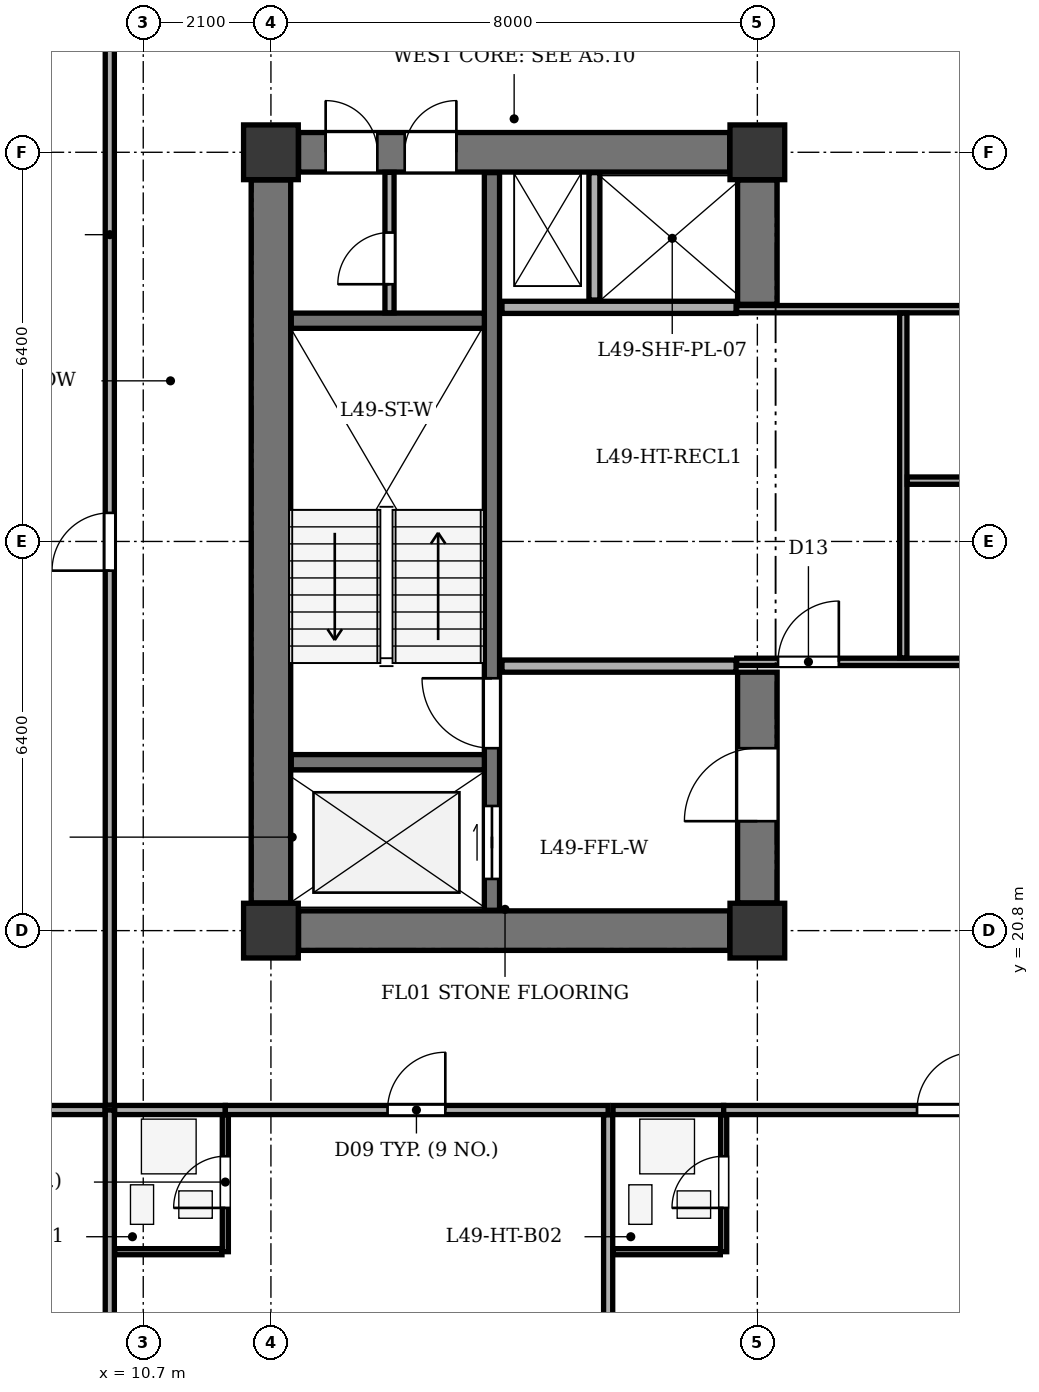
"""IFC4 building model, lengths in metres.
Left out: names, types, materials, properties, quantities, classifications, styles, units other than length and angle.
Written with IfcOpenShell. Run it as: python <this file> out.ifc"""

import sys

from ifc_helpers import new_model, si_unit, direction, frame, frame_2d, origin, origin_2d, place, context, subcontext, project, spatial, rectangle, extrude, element, fill, save


model = new_model("IFC4")
c1 = context("Model", 3, precision=1e-05, world=origin(), true_north=direction((0.0, 1.0)))
c2 = subcontext(c1, "Body", "Model", "MODEL_VIEW")
j1 = project(units=[si_unit("LENGTHUNIT", "METRE"), si_unit("PLANEANGLEUNIT", "RADIAN")], contexts=[c1])
p1 = place(None, origin())
s1 = spatial("IfcSite", under=j1, at=p1, CompositionType="ELEMENT")
p2 = place(p1, origin())
s2 = spatial("IfcBuilding", under=s1, at=p2, CompositionType="ELEMENT")
p3 = place(p2, frame((0.0, 0.0, 190.3)))
s3 = spatial("IfcBuildingStorey", under=s2, at=p3, CompositionType="ELEMENT", Elevation=190.3)
for number, where, z_axis, x_axis in (
    (1, (12.8, 20.8, 0.0), (0.0, 0.0, 1.0), (1.0, 0.0, 0.0)),
    (2, (20.8, 20.8, 0.0), (0.0, 0.0, 1.0), (1.0, 0.0, 0.0)),
    (3, (12.8, 33.6, 0.0), (0.0, 0.0, 1.0), (1.0, 0.0, 0.0)),
    (4, (20.8, 33.6, 0.0), (0.0, 0.0, 1.0), (1.0, 0.0, 0.0)),
):
    element("IfcColumn", number, at=place(p3, frame(where, z_axis=z_axis, x_axis=x_axis)), inside=s3, PredefinedType="COLUMN", context=c2, shape_type="SweptSolid", body=[
        extrude(rectangle(XDim=0.9, YDim=0.9, at=origin_2d()), origin(), (0.0, 0.0, 1.0), 3.5),
    ])
p4 = place(p3, frame((12.8, 21.255, 0.0), z_axis=(0.0, 0.0, 1.0), x_axis=(0.0, 1.0, 0.0)))
e5 = element("IfcWall", 5, at=p4, inside=s3, PredefinedType="SHEAR", context=c2, shape_type="SweptSolid", body=[
    extrude(rectangle(XDim=11.89, YDim=0.65, at=frame_2d((5.945, 0.0))), origin(), (0.0, 0.0, 1.0), 3.2),
])
p5 = place(p3, frame((13.255, 20.8, 0.0), z_axis=(0.0, 0.0, 1.0), x_axis=(1.0, 0.0, 0.0)))
e6 = element("IfcWall", 6, at=p5, inside=s3, PredefinedType="SHEAR", context=c2, shape_type="SweptSolid", body=[
    extrude(rectangle(XDim=7.09, YDim=0.65, at=frame_2d((3.545, 0.0))), origin(), (0.0, 0.0, 1.0), 3.2),
])
p6 = place(p3, frame((13.255, 33.6, 0.0), z_axis=(0.0, 0.0, 1.0), x_axis=(1.0, 0.0, 0.0)))
e7 = element("IfcWall", 7, at=p6, inside=s3, PredefinedType="SHEAR", context=c2, shape_type="SweptSolid", body=[
    extrude(rectangle(XDim=7.09, YDim=0.65, at=frame_2d((3.545, 0.0))), origin(), (0.0, 0.0, 1.0), 3.2),
])
p7 = place(p6, frame((0.445, 0.0, 0.0)))
e8 = element("IfcOpeningElement", 8, at=p7, cuts=e7, PredefinedType="OPENING", context=c2, shape_type="SweptSolid", body=[
    extrude(rectangle(XDim=0.85, YDim=2.02, at=frame_2d((0.425, 1.01))), frame((0.0, 0.335, 0.0), z_axis=(0.0, -1.0, 0.0), x_axis=(1.0, 0.0, 0.0)), (0.0, 0.0, 1.0), 0.67),
])
p8 = place(p6, frame((1.745, 0.0, 0.0)))
e9 = element("IfcOpeningElement", 9, at=p8, cuts=e7, PredefinedType="OPENING", context=c2, shape_type="SweptSolid", body=[
    extrude(rectangle(XDim=0.85, YDim=2.02, at=frame_2d((0.425, 1.01))), frame((0.0, 0.335, 0.0), z_axis=(0.0, -1.0, 0.0), x_axis=(1.0, 0.0, 0.0)), (0.0, 0.0, 1.0), 0.67),
])
p9 = place(p3, frame((20.8, 21.255, 0.0), z_axis=(0.0, 0.0, 1.0), x_axis=(0.0, 1.0, 0.0)))
e10 = element("IfcWall", 10, at=p9, inside=s3, PredefinedType="SHEAR", context=c2, shape_type="SweptSolid", body=[
    extrude(rectangle(XDim=3.795, YDim=0.65, at=frame_2d((1.897, 0.0))), origin(), (0.0, 0.0, 1.0), 3.2),
])
p10 = place(p9, frame((1.345, 0.0, 0.0)))
e11 = element("IfcOpeningElement", 11, at=p10, cuts=e10, PredefinedType="OPENING", context=c2, shape_type="SweptSolid", body=[
    extrude(rectangle(XDim=1.2, YDim=2.15, at=frame_2d((0.6, 1.075))), frame((0.0, 0.335, 0.0), z_axis=(0.0, -1.0, 0.0), x_axis=(1.0, 0.0, 0.0)), (0.0, 0.0, 1.0), 0.67),
])
p11 = place(p3, frame((20.8, 31.1, 0.0), z_axis=(0.0, 0.0, 1.0), x_axis=(0.0, 1.0, 0.0)))
e12 = element("IfcWall", 12, at=p11, inside=s3, PredefinedType="SHEAR", context=c2, shape_type="SweptSolid", body=[
    extrude(rectangle(XDim=2.045, YDim=0.65, at=frame_2d((1.022, 0.0))), origin(), (0.0, 0.0, 1.0), 3.2),
])
p12 = place(p3, frame((16.435, 21.135, 0.0), z_axis=(0.0, 0.0, 1.0), x_axis=(0.0, 1.0, 0.0)))
e13 = element("IfcWall", 13, at=p12, inside=s3, PredefinedType="SHEAR", context=c2, shape_type="SweptSolid", body=[
    extrude(rectangle(XDim=12.13, YDim=0.25, at=frame_2d((6.065, 0.0))), origin(), (0.0, 0.0, 1.0), 3.2),
])
p13 = place(p12, frame((0.515, 0.0, 0.0)))
e14 = element("IfcOpeningElement", 14, at=p13, cuts=e13, PredefinedType="OPENING", context=c2, shape_type="SweptSolid", body=[
    extrude(rectangle(XDim=1.2, YDim=2.15, at=frame_2d((0.6, 1.075))), frame((0.0, 0.135, 0.0), z_axis=(0.0, -1.0, 0.0), x_axis=(1.0, 0.0, 0.0)), (0.0, 0.0, 1.0), 0.27),
])
p14 = place(p12, frame((2.665, 0.0, 0.0)))
e15 = element("IfcOpeningElement", 15, at=p14, cuts=e13, PredefinedType="OPENING", context=c2, shape_type="SweptSolid", body=[
    extrude(rectangle(XDim=1.15, YDim=2.15, at=frame_2d((0.575, 1.075))), frame((0.0, 0.135, 0.0), z_axis=(0.0, -1.0, 0.0), x_axis=(1.0, 0.0, 0.0)), (0.0, 0.0, 1.0), 0.27),
])
for number, where, z_axis, x_axis in (
    (16, (13.135, 23.57, 0.0), (0.0, 0.0, 1.0), (1.0, 0.0, 0.0)),
    (17, (13.135, 30.83, 0.0), (0.0, 0.0, 1.0), (1.0, 0.0, 0.0)),
):
    element("IfcWall", number, at=place(p3, frame(where, z_axis=z_axis, x_axis=x_axis)), inside=s3, PredefinedType="SHEAR", context=c2, shape_type="SweptSolid", body=[
        extrude(rectangle(XDim=3.175, YDim=0.25, at=frame_2d((1.587, 0.0))), origin(), (0.0, 0.0, 1.0), 3.2),
    ])
for number, where, z_axis, x_axis in (
    (18, (16.6, 25.15, 0.0), (0.0, 0.0, 1.0), (1.0, 0.0, 0.0)),
    (19, (16.6, 31.05, 0.0), (0.0, 0.0, 1.0), (1.0, 0.0, 0.0)),
):
    element("IfcWall", number, at=place(p3, frame(where, z_axis=z_axis, x_axis=x_axis)), inside=s3, PredefinedType="SOLIDWALL", context=c2, shape_type="SweptSolid", body=[
        extrude(rectangle(XDim=3.85, YDim=0.2, at=frame_2d((1.925, 0.0))), origin(), (0.0, 0.0, 1.0), 3.2),
    ])
p15 = place(p3, frame((18.12, 31.17, 0.0), z_axis=(0.0, 0.0, 1.0), x_axis=(0.0, 1.0, 0.0)))
e20 = element("IfcWall", 20, at=p15, inside=s3, PredefinedType="PARTITIONING", context=c2, shape_type="SweptSolid", body=[
    extrude(rectangle(XDim=2.095, YDim=0.18, at=frame_2d((1.047, 0.0))), origin(), (0.0, 0.0, 1.0), 3.2),
])
p16 = place(p3, frame((14.75, 30.96, 0.0), z_axis=(0.0, 0.0, 1.0), x_axis=(0.0, 1.0, 0.0)))
e21 = element("IfcWall", 21, at=p16, inside=s3, PredefinedType="PARTITIONING", context=c2, shape_type="SweptSolid", body=[
    extrude(rectangle(XDim=2.31, YDim=0.15, at=frame_2d((1.155, 0.0))), origin(), (0.0, 0.0, 1.0), 3.2),
])
p17 = place(p16, frame((0.47, 0.0, 0.0)))
e22 = element("IfcOpeningElement", 22, at=p17, cuts=e21, PredefinedType="OPENING", context=c2, shape_type="SweptSolid", body=[
    extrude(rectangle(XDim=0.85, YDim=2.02, at=frame_2d((0.425, 1.01))), frame((0.0, 0.085, 0.0), z_axis=(0.0, -1.0, 0.0), x_axis=(1.0, 0.0, 0.0)), (0.0, 0.0, 1.0), 0.17),
])
p18 = place(p3, frame((20.46, 25.22, 0.0), z_axis=(0.0, 0.0, 1.0), x_axis=(1.0, 0.0, 0.0)))
e23 = element("IfcWall", 23, at=p18, inside=s3, PredefinedType="PARTITIONING", context=c2, shape_type="SweptSolid", body=[
    extrude(rectangle(XDim=11.94, YDim=0.12, at=frame_2d((5.97, 0.0))), origin(), (0.0, 0.0, 1.0), 3.2),
])
p19 = place(p18, frame((0.68, 0.0, 0.0)))
e24 = element("IfcOpeningElement", 24, at=p19, cuts=e23, PredefinedType="OPENING", context=c2, shape_type="SweptSolid", body=[
    extrude(rectangle(XDim=1.0, YDim=2.1, at=frame_2d((0.5, 1.05))), frame((0.0, 0.07, 0.0), z_axis=(0.0, -1.0, 0.0), x_axis=(1.0, 0.0, 0.0)), (0.0, 0.0, 1.0), 0.14),
])
p20 = place(p3, frame((20.46, 31.02, 0.0), z_axis=(0.0, 0.0, 1.0), x_axis=(1.0, 0.0, 0.0)))
e25 = element("IfcWall", 25, at=p20, inside=s3, PredefinedType="PARTITIONING", context=c2, shape_type="SweptSolid", body=[
    extrude(rectangle(XDim=11.94, YDim=0.12, at=frame_2d((5.97, 0.0))), origin(), (0.0, 0.0, 1.0), 3.2),
])
p21 = place(p3, frame((23.2, 25.285, 0.0), z_axis=(0.0, 0.0, 1.0), x_axis=(0.0, 1.0, 0.0)))
e26 = element("IfcWall", 26, at=p21, inside=s3, PredefinedType="PARTITIONING", context=c2, shape_type="SweptSolid", body=[
    extrude(rectangle(XDim=5.67, YDim=0.12, at=frame_2d((2.835, 0.0))), origin(), (0.0, 0.0, 1.0), 3.2),
])
p22 = place(p3, frame((23.265, 28.2, 0.0), z_axis=(0.0, 0.0, 1.0), x_axis=(1.0, 0.0, 0.0)))
e27 = element("IfcWall", 27, at=p22, inside=s3, PredefinedType="PARTITIONING", context=c2, shape_type="SweptSolid", body=[
    extrude(rectangle(XDim=9.07, YDim=0.12, at=frame_2d((4.535, 0.0))), origin(), (0.0, 0.0, 1.0), 3.2),
])
p23 = place(p3, frame((10.15, 8.275, 0.0), z_axis=(0.0, 0.0, 1.0), x_axis=(0.0, 1.0, 0.0)))
e28 = element("IfcWall", 28, at=p23, inside=s3, PredefinedType="PARTITIONING", context=c2, shape_type="SweptSolid", body=[
    extrude(rectangle(XDim=9.575, YDim=0.15, at=frame_2d((4.788, 0.0))), origin(), (0.0, 0.0, 1.0), 3.2),
])
p24 = place(p3, frame((10.23, 17.85, 0.0), z_axis=(0.0, 0.0, 1.0), x_axis=(1.0, 0.0, 0.0)))
e29 = element("IfcWall", 29, at=p24, inside=s3, PredefinedType="PARTITIONING", context=c2, shape_type="SweptSolid", body=[
    extrude(rectangle(XDim=1.82, YDim=0.15, at=frame_2d((0.91, 0.0))), origin(), (0.0, 0.0, 1.0), 3.2),
])
p25 = place(p3, frame((12.05, 17.85, 0.0), z_axis=(0.0, 0.0, 1.0), x_axis=(1.0, 0.0, 0.0)))
e30 = element("IfcWall", 30, at=p25, inside=s3, PredefinedType="PARTITIONING", context=c2, shape_type="SweptSolid", body=[
    extrude(rectangle(XDim=6.296, YDim=0.15, at=frame_2d((3.148, 0.0))), origin(), (0.0, 0.0, 1.0), 3.2),
])
p26 = place(p25, frame((2.668, 0.0, 0.0)))
e31 = element("IfcOpeningElement", 31, at=p26, cuts=e30, PredefinedType="OPENING", context=c2, shape_type="SweptSolid", body=[
    extrude(rectangle(XDim=0.95, YDim=2.1, at=frame_2d((0.475, 1.05))), frame((0.0, 0.085, 0.0), z_axis=(0.0, -1.0, 0.0), x_axis=(1.0, 0.0, 0.0)), (0.0, 0.0, 1.0), 0.17),
])
p27 = place(p3, frame((12.05, 15.52, 0.0), z_axis=(0.0, 0.0, 1.0), x_axis=(0.0, 1.0, 0.0)))
e32 = element("IfcWall", 32, at=p27, inside=s3, PredefinedType="PARTITIONING", context=c2, shape_type="SweptSolid", body=[
    extrude(rectangle(XDim=2.25, YDim=0.1, at=frame_2d((1.125, 0.0))), origin(), (0.0, 0.0, 1.0), 3.2),
])
p28 = place(p27, frame((0.72, 0.0, 0.0)))
e33 = element("IfcOpeningElement", 33, at=p28, cuts=e32, PredefinedType="OPENING", context=c2, shape_type="SweptSolid", body=[
    extrude(rectangle(XDim=0.85, YDim=2.05, at=frame_2d((0.425, 1.025))), frame((0.0, 0.06, 0.0), z_axis=(0.0, -1.0, 0.0), x_axis=(1.0, 0.0, 0.0)), (0.0, 0.0, 1.0), 0.12),
])
p29 = place(p3, frame((10.23, 15.52, 0.0), z_axis=(0.0, 0.0, 1.0), x_axis=(1.0, 0.0, 0.0)))
e34 = element("IfcWall", 34, at=p29, inside=s3, PredefinedType="PARTITIONING", context=c2, shape_type="SweptSolid", body=[
    extrude(rectangle(XDim=1.765, YDim=0.1, at=frame_2d((0.883, 0.0))), origin(), (0.0, 0.0, 1.0), 3.2),
])
p30 = place(p3, frame((18.346, 8.275, 0.0), z_axis=(0.0, 0.0, 1.0), x_axis=(0.0, 1.0, 0.0)))
e35 = element("IfcWall", 35, at=p30, inside=s3, PredefinedType="PARTITIONING", context=c2, shape_type="SweptSolid", body=[
    extrude(rectangle(XDim=9.495, YDim=0.15, at=frame_2d((4.748, 0.0))), origin(), (0.0, 0.0, 1.0), 3.2),
])
p31 = place(p3, frame((18.426, 17.85, 0.0), z_axis=(0.0, 0.0, 1.0), x_axis=(1.0, 0.0, 0.0)))
e36 = element("IfcWall", 36, at=p31, inside=s3, PredefinedType="PARTITIONING", context=c2, shape_type="SweptSolid", body=[
    extrude(rectangle(XDim=1.82, YDim=0.15, at=frame_2d((0.91, 0.0))), origin(), (0.0, 0.0, 1.0), 3.2),
])
p32 = place(p3, frame((20.246, 17.85, 0.0), z_axis=(0.0, 0.0, 1.0), x_axis=(1.0, 0.0, 0.0)))
e37 = element("IfcWall", 37, at=p32, inside=s3, PredefinedType="PARTITIONING", context=c2, shape_type="SweptSolid", body=[
    extrude(rectangle(XDim=7.32, YDim=0.15, at=frame_2d((3.66, 0.0))), origin(), (0.0, 0.0, 1.0), 3.2),
])
p33 = place(p32, frame((3.18, 0.0, 0.0)))
e38 = element("IfcOpeningElement", 38, at=p33, cuts=e37, PredefinedType="OPENING", context=c2, shape_type="SweptSolid", body=[
    extrude(rectangle(XDim=0.95, YDim=2.1, at=frame_2d((0.475, 1.05))), frame((0.0, 0.085, 0.0), z_axis=(0.0, -1.0, 0.0), x_axis=(1.0, 0.0, 0.0)), (0.0, 0.0, 1.0), 0.17),
])
p34 = place(p3, frame((20.246, 15.52, 0.0), z_axis=(0.0, 0.0, 1.0), x_axis=(0.0, 1.0, 0.0)))
e39 = element("IfcWall", 39, at=p34, inside=s3, PredefinedType="PARTITIONING", context=c2, shape_type="SweptSolid", body=[
    extrude(rectangle(XDim=2.25, YDim=0.1, at=frame_2d((1.125, 0.0))), origin(), (0.0, 0.0, 1.0), 3.2),
])
p35 = place(p34, frame((0.72, 0.0, 0.0)))
e40 = element("IfcOpeningElement", 40, at=p35, cuts=e39, PredefinedType="OPENING", context=c2, shape_type="SweptSolid", body=[
    extrude(rectangle(XDim=0.85, YDim=2.05, at=frame_2d((0.425, 1.025))), frame((0.0, 0.06, 0.0), z_axis=(0.0, -1.0, 0.0), x_axis=(1.0, 0.0, 0.0)), (0.0, 0.0, 1.0), 0.12),
])
p36 = place(p3, frame((18.426, 15.52, 0.0), z_axis=(0.0, 0.0, 1.0), x_axis=(1.0, 0.0, 0.0)))
e41 = element("IfcWall", 41, at=p36, inside=s3, PredefinedType="PARTITIONING", context=c2, shape_type="SweptSolid", body=[
    extrude(rectangle(XDim=1.765, YDim=0.1, at=frame_2d((0.882, 0.0))), origin(), (0.0, 0.0, 1.0), 3.2),
])
p37 = place(p3, frame((4.675, 17.85, 0.0), z_axis=(0.0, 0.0, 1.0), x_axis=(1.0, 0.0, 0.0)))
e42 = element("IfcWall", 42, at=p37, inside=s3, PredefinedType="PARTITIONING", context=c2, shape_type="SweptSolid", body=[
    extrude(rectangle(XDim=5.395, YDim=0.15, at=frame_2d((2.698, 0.0))), origin(), (0.0, 0.0, 1.0), 3.2),
])
p38 = place(p3, frame((10.15, 17.93, 0.0), z_axis=(0.0, 0.0, 1.0), x_axis=(0.0, 1.0, 0.0)))
e43 = element("IfcWall", 43, at=p38, inside=s3, PredefinedType="PARTITIONING", context=c2, shape_type="SweptSolid", body=[
    extrude(rectangle(XDim=18.54, YDim=0.15, at=frame_2d((9.27, 0.0))), origin(), (0.0, 0.0, 1.0), 3.2),
])
p39 = place(p38, frame((8.79, 0.0, 0.0)))
e44 = element("IfcOpeningElement", 44, at=p39, cuts=e43, PredefinedType="OPENING", context=c2, shape_type="SweptSolid", body=[
    extrude(rectangle(XDim=0.95, YDim=2.1, at=frame_2d((0.475, 1.05))), frame((0.0, 0.085, 0.0), z_axis=(0.0, -1.0, 0.0), x_axis=(1.0, 0.0, 0.0)), (0.0, 0.0, 1.0), 0.17),
])
p40 = place(p7, origin())
e45 = element("IfcDoor", 45, at=p40, inside=s3, OperationType="SINGLE_SWING_LEFT", PredefinedType="DOOR", context=c2, shape_type="SweptSolid", body=[
    extrude(rectangle(XDim=0.85, YDim=2.02, at=frame_2d((0.425, 1.01))), frame((0.0, 0.025, 0.0), z_axis=(0.0, -1.0, 0.0), x_axis=(1.0, 0.0, 0.0)), (0.0, 0.0, 1.0), 0.05),
])
fill(e8, e45)
p41 = place(p8, origin())
e46 = element("IfcDoor", 46, at=p41, inside=s3, OperationType="SINGLE_SWING_RIGHT", PredefinedType="DOOR", context=c2, shape_type="SweptSolid", body=[
    extrude(rectangle(XDim=0.85, YDim=2.02, at=frame_2d((0.425, 1.01))), frame((0.0, 0.025, 0.0), z_axis=(0.0, -1.0, 0.0), x_axis=(1.0, 0.0, 0.0)), (0.0, 0.0, 1.0), 0.05),
])
fill(e9, e46)
p42 = place(p10, origin())
e47 = element("IfcDoor", 47, at=p42, inside=s3, OperationType="SINGLE_SWING_LEFT", PredefinedType="DOOR", context=c2, shape_type="SweptSolid", body=[
    extrude(rectangle(XDim=1.2, YDim=2.15, at=frame_2d((0.6, 1.075))), frame((0.0, 0.025, 0.0), z_axis=(0.0, -1.0, 0.0), x_axis=(1.0, 0.0, 0.0)), (0.0, 0.0, 1.0), 0.05),
])
fill(e11, e47)
p43 = place(p13, origin())
e48 = element("IfcDoor", 48, at=p43, inside=s3, OperationType="DOUBLE_DOOR_SLIDING", PredefinedType="DOOR", context=c2, shape_type="SweptSolid", body=[
    extrude(rectangle(XDim=1.2, YDim=2.15, at=frame_2d((0.6, 1.075))), frame((0.0, 0.025, 0.0), z_axis=(0.0, -1.0, 0.0), x_axis=(1.0, 0.0, 0.0)), (0.0, 0.0, 1.0), 0.05),
])
fill(e14, e48)
p44 = place(p14, origin())
e49 = element("IfcDoor", 49, at=p44, inside=s3, OperationType="SINGLE_SWING_RIGHT", PredefinedType="DOOR", context=c2, shape_type="SweptSolid", body=[
    extrude(rectangle(XDim=1.15, YDim=2.15, at=frame_2d((0.575, 1.075))), frame((0.0, 0.025, 0.0), z_axis=(0.0, -1.0, 0.0), x_axis=(1.0, 0.0, 0.0)), (0.0, 0.0, 1.0), 0.05),
])
fill(e15, e49)
p45 = place(p17, origin())
e50 = element("IfcDoor", 50, at=p45, inside=s3, OperationType="SINGLE_SWING_LEFT", PredefinedType="DOOR", context=c2, shape_type="SweptSolid", body=[
    extrude(rectangle(XDim=0.85, YDim=2.02, at=frame_2d((0.425, 1.01))), frame((0.0, 0.025, 0.0), z_axis=(0.0, -1.0, 0.0), x_axis=(1.0, 0.0, 0.0)), (0.0, 0.0, 1.0), 0.05),
])
fill(e22, e50)
p46 = place(p19, origin())
e51 = element("IfcDoor", 51, at=p46, inside=s3, OperationType="SINGLE_SWING_RIGHT", PredefinedType="DOOR", context=c2, shape_type="SweptSolid", body=[
    extrude(rectangle(XDim=1.0, YDim=2.1, at=frame_2d((0.5, 1.05))), frame((0.0, 0.025, 0.0), z_axis=(0.0, -1.0, 0.0), x_axis=(1.0, 0.0, 0.0)), (0.0, 0.0, 1.0), 0.05),
])
fill(e24, e51)
p47 = place(p28, origin())
e52 = element("IfcDoor", 52, at=p47, inside=s3, OperationType="SINGLE_SWING_LEFT", PredefinedType="DOOR", context=c2, shape_type="SweptSolid", body=[
    extrude(rectangle(XDim=0.85, YDim=2.05, at=frame_2d((0.425, 1.025))), frame((0.0, 0.025, 0.0), z_axis=(0.0, -1.0, 0.0), x_axis=(1.0, 0.0, 0.0)), (0.0, 0.0, 1.0), 0.05),
])
fill(e33, e52)
p48 = place(p26, origin())
e53 = element("IfcDoor", 53, at=p48, inside=s3, OperationType="SINGLE_SWING_RIGHT", PredefinedType="DOOR", context=c2, shape_type="SweptSolid", body=[
    extrude(rectangle(XDim=0.95, YDim=2.1, at=frame_2d((0.475, 1.05))), frame((0.0, 0.025, 0.0), z_axis=(0.0, -1.0, 0.0), x_axis=(1.0, 0.0, 0.0)), (0.0, 0.0, 1.0), 0.05),
])
fill(e31, e53)
p49 = place(p35, origin())
e54 = element("IfcDoor", 54, at=p49, inside=s3, OperationType="SINGLE_SWING_LEFT", PredefinedType="DOOR", context=c2, shape_type="SweptSolid", body=[
    extrude(rectangle(XDim=0.85, YDim=2.05, at=frame_2d((0.425, 1.025))), frame((0.0, 0.025, 0.0), z_axis=(0.0, -1.0, 0.0), x_axis=(1.0, 0.0, 0.0)), (0.0, 0.0, 1.0), 0.05),
])
fill(e40, e54)
p50 = place(p33, origin())
e55 = element("IfcDoor", 55, at=p50, inside=s3, OperationType="SINGLE_SWING_RIGHT", PredefinedType="DOOR", context=c2, shape_type="SweptSolid", body=[
    extrude(rectangle(XDim=0.95, YDim=2.1, at=frame_2d((0.475, 1.05))), frame((0.0, 0.025, 0.0), z_axis=(0.0, -1.0, 0.0), x_axis=(1.0, 0.0, 0.0)), (0.0, 0.0, 1.0), 0.05),
])
fill(e38, e55)
p51 = place(p39, origin())
e56 = element("IfcDoor", 56, at=p51, inside=s3, OperationType="SINGLE_SWING_LEFT", PredefinedType="DOOR", context=c2, shape_type="SweptSolid", body=[
    extrude(rectangle(XDim=0.95, YDim=2.1, at=frame_2d((0.475, 1.05))), frame((0.0, 0.025, 0.0), z_axis=(0.0, -1.0, 0.0), x_axis=(1.0, 0.0, 0.0)), (0.0, 0.0, 1.0), 0.05),
])
fill(e44, e56)
save(model, sys.argv[1])
